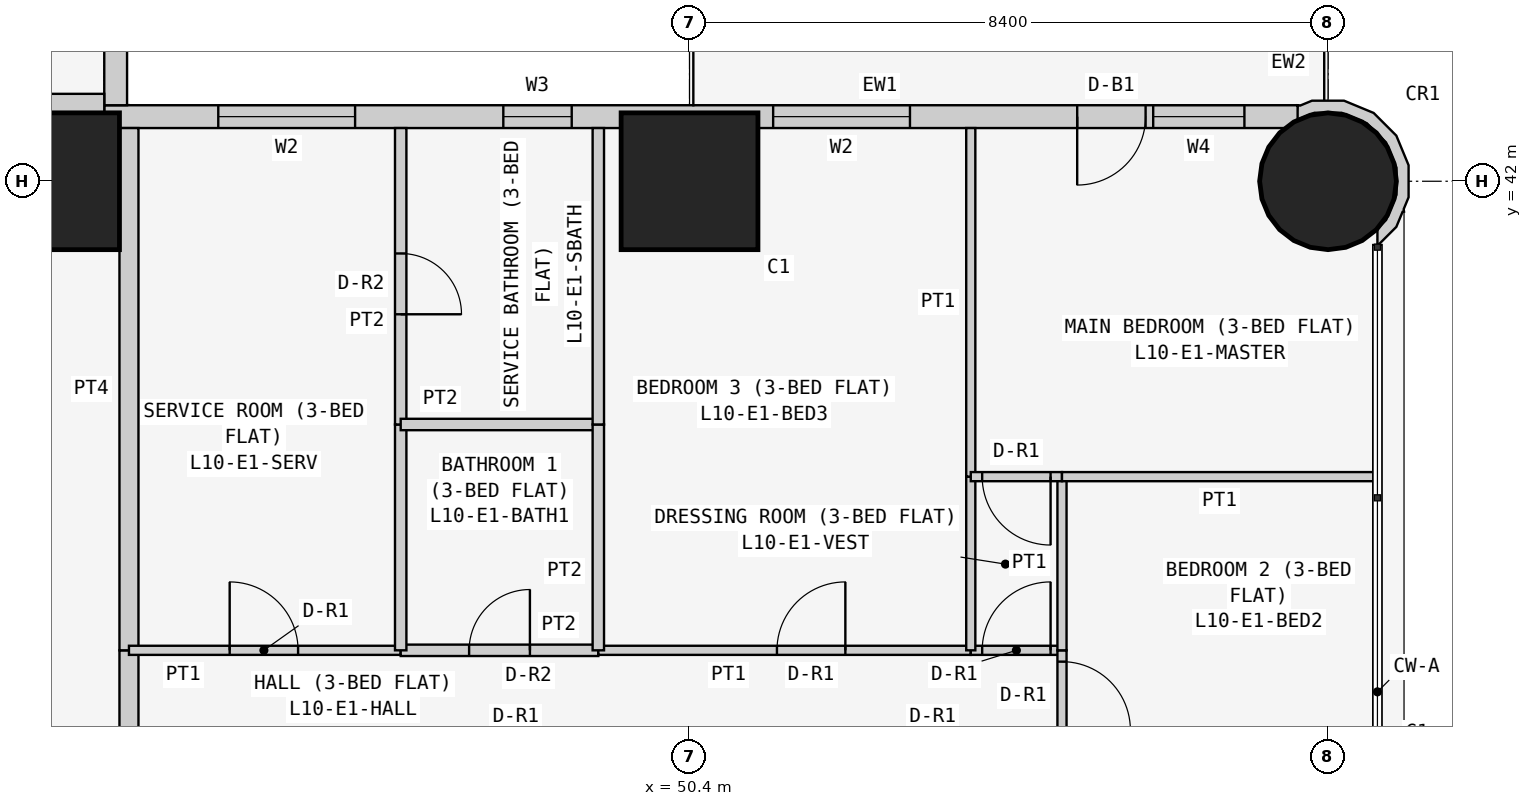
"""IFC4 building model, lengths in metres.
Left out: names, types, materials, properties, quantities, classifications, styles, units other than length and angle.
Written with IfcOpenShell. Run it as: python <this file> out.ifc"""

import sys

from ifc_helpers import new_model, si_unit, direction, frame, frame_2d, origin, origin_2d, place, context, subcontext, project, spatial, polyline, rectangle, circle, outline, extrude, element, fill, save


model = new_model("IFC4")
c1 = context("Model", 3, precision=1e-05, world=origin(), true_north=direction((0.0, 1.0)))
c2 = subcontext(c1, "Body", "Model", "MODEL_VIEW")
j1 = project(units=[si_unit("LENGTHUNIT", "METRE"), si_unit("PLANEANGLEUNIT", "RADIAN")], contexts=[c1])
p1 = place(None, origin())
s1 = spatial("IfcSite", under=j1, at=p1, CompositionType="ELEMENT")
p2 = place(p1, origin())
s2 = spatial("IfcBuilding", under=s1, at=p2, CompositionType="ELEMENT")
p3 = place(p2, frame((0.0, 0.0, 45.3)))
s3 = spatial("IfcBuildingStorey", under=s2, at=p3, CompositionType="ELEMENT", Elevation=45.3)
for number, where, z_axis, x_axis in (
    (1, (42.0, 42.0, 0.0), (0.0, 0.0, 1.0), (1.0, 0.0, 0.0)),
    (2, (50.4, 42.0, 0.0), (0.0, 0.0, 1.0), (1.0, 0.0, 0.0)),
):
    element("IfcColumn", number, at=place(p3, frame(where, z_axis=z_axis, x_axis=x_axis)), inside=s3, PredefinedType="COLUMN", context=c2, shape_type="SweptSolid", body=[
        extrude(rectangle(XDim=1.8, YDim=1.8, at=origin_2d()), origin(), (0.0, 0.0, 1.0), 3.6),
    ])
p4 = place(p3, frame((58.8, 42.0, 0.0), z_axis=(0.0, 0.0, 1.0), x_axis=(1.0, 0.0, 0.0)))
e3 = element("IfcColumn", 3, at=p4, inside=s3, PredefinedType="COLUMN", context=c2, shape_type="SweptSolid", body=[
    extrude(circle(Radius=0.9, at=origin_2d()), origin(), (0.0, 0.0, 1.0), 3.6),
])
p5 = place(p3, frame((58.4, 42.85, 0.0), z_axis=(0.0, 0.0, 1.0), x_axis=(-1.0, 0.0, 0.0)))
e4 = element("IfcWall", 4, at=p5, inside=s3, PredefinedType="SOLIDWALL", context=c2, shape_type="SweptSolid", body=[
    extrude(rectangle(XDim=15.7, YDim=0.3, at=frame_2d((7.85, 0.0))), origin(), (0.0, 0.0, 1.0), 3.45),
])
p6 = place(p5, frame((12.4, 0.0, 0.9)))
e5 = element("IfcOpeningElement", 5, at=p6, cuts=e4, PredefinedType="OPENING", context=c2, shape_type="SweptSolid", body=[
    extrude(rectangle(XDim=1.8, YDim=1.5, at=frame_2d((0.9, 0.75))), frame((0.0, 0.16, 0.0), z_axis=(0.0, -1.0, 0.0), x_axis=(1.0, 0.0, 0.0)), (0.0, 0.0, 1.0), 0.32),
])
p7 = place(p5, frame((9.55, 0.0, 1.5)))
e6 = element("IfcOpeningElement", 6, at=p7, cuts=e4, PredefinedType="OPENING", context=c2, shape_type="SweptSolid", body=[
    extrude(rectangle(XDim=0.9, YDim=0.7, at=frame_2d((0.45, 0.35))), frame((0.0, 0.16, 0.0), z_axis=(0.0, -1.0, 0.0), x_axis=(1.0, 0.0, 0.0)), (0.0, 0.0, 1.0), 0.32),
])
p8 = place(p5, frame((5.1, 0.0, 0.9)))
e7 = element("IfcOpeningElement", 7, at=p8, cuts=e4, PredefinedType="OPENING", context=c2, shape_type="SweptSolid", body=[
    extrude(rectangle(XDim=1.8, YDim=1.5, at=frame_2d((0.9, 0.75))), frame((0.0, 0.16, 0.0), z_axis=(0.0, -1.0, 0.0), x_axis=(1.0, 0.0, 0.0)), (0.0, 0.0, 1.0), 0.32),
])
p9 = place(p5, frame((2.0, 0.0, 0.0)))
e8 = element("IfcOpeningElement", 8, at=p9, cuts=e4, PredefinedType="OPENING", context=c2, shape_type="SweptSolid", body=[
    extrude(rectangle(XDim=0.9, YDim=2.4, at=frame_2d((0.45, 1.2))), frame((0.0, 0.16, 0.0), z_axis=(0.0, -1.0, 0.0), x_axis=(1.0, 0.0, 0.0)), (0.0, 0.0, 1.0), 0.32),
])
p10 = place(p5, frame((0.7, 0.0, 0.9)))
e9 = element("IfcOpeningElement", 9, at=p10, cuts=e4, PredefinedType="OPENING", context=c2, shape_type="SweptSolid", body=[
    extrude(rectangle(XDim=1.2, YDim=1.5, at=frame_2d((0.6, 0.75))), frame((0.0, 0.16, 0.0), z_axis=(0.0, -1.0, 0.0), x_axis=(1.0, 0.0, 0.0)), (0.0, 0.0, 1.0), 0.32),
])
p11 = place(p3, frame((42.85, 43.0, 0.0), z_axis=(0.0, 0.0, 1.0), x_axis=(0.0, 1.0, 0.0)))
e10 = element("IfcWall", 10, at=p11, inside=s3, PredefinedType="SOLIDWALL", context=c2, shape_type="SweptSolid", body=[
    extrude(rectangle(XDim=15.4, YDim=0.3, at=frame_2d((7.7, 0.0))), origin(), (0.0, 0.0, 1.0), 3.45),
])
p12 = place(p11, frame((1.2, 0.0, 0.9)))
e11 = element("IfcOpeningElement", 11, at=p12, cuts=e10, PredefinedType="OPENING", context=c2, shape_type="SweptSolid", body=[
    extrude(rectangle(XDim=1.8, YDim=1.5, at=frame_2d((0.9, 0.75))), frame((0.0, 0.16, 0.0), z_axis=(0.0, -1.0, 0.0), x_axis=(1.0, 0.0, 0.0)), (0.0, 0.0, 1.0), 0.32),
])
p13 = place(p11, frame((4.95, 0.0, 1.5)))
e12 = element("IfcOpeningElement", 12, at=p13, cuts=e10, PredefinedType="OPENING", context=c2, shape_type="SweptSolid", body=[
    extrude(rectangle(XDim=0.9, YDim=0.7, at=frame_2d((0.45, 0.35))), frame((0.0, 0.16, 0.0), z_axis=(0.0, -1.0, 0.0), x_axis=(1.0, 0.0, 0.0)), (0.0, 0.0, 1.0), 0.32),
])
p14 = place(p11, frame((8.5, 0.0, 0.9)))
e13 = element("IfcOpeningElement", 13, at=p14, cuts=e10, PredefinedType="OPENING", context=c2, shape_type="SweptSolid", body=[
    extrude(rectangle(XDim=1.8, YDim=1.5, at=frame_2d((0.9, 0.75))), frame((0.0, 0.16, 0.0), z_axis=(0.0, -1.0, 0.0), x_axis=(1.0, 0.0, 0.0)), (0.0, 0.0, 1.0), 0.32),
])
p15 = place(p11, frame((12.5, 0.0, 0.0)))
e14 = element("IfcOpeningElement", 14, at=p15, cuts=e10, PredefinedType="OPENING", context=c2, shape_type="SweptSolid", body=[
    extrude(rectangle(XDim=0.9, YDim=2.4, at=frame_2d((0.45, 1.2))), frame((0.0, 0.16, 0.0), z_axis=(0.0, -1.0, 0.0), x_axis=(1.0, 0.0, 0.0)), (0.0, 0.0, 1.0), 0.32),
])
p16 = place(p11, frame((13.5, 0.0, 0.9)))
e15 = element("IfcOpeningElement", 15, at=p16, cuts=e10, PredefinedType="OPENING", context=c2, shape_type="SweptSolid", body=[
    extrude(rectangle(XDim=1.2, YDim=1.5, at=frame_2d((0.6, 0.75))), frame((0.0, 0.16, 0.0), z_axis=(0.0, -1.0, 0.0), x_axis=(1.0, 0.0, 0.0)), (0.0, 0.0, 1.0), 0.32),
])
p17 = place(p3, frame((59.411, 41.233, 0.0), z_axis=(0.0, 0.0, 1.0), x_axis=(0.926129809145, 0.377204953059, 0.0)))
e16 = element("IfcWall", 16, at=p17, inside=s3, PredefinedType="SOLIDWALL", context=c2, shape_type="SweptSolid", body=[
    extrude(outline(polyline([(0.626, 0.345), (0.785, 0.736), (0.782, 1.157), (0.619, 1.546), (0.319, 1.843), (-0.072, 2.002), (-0.24, 2.001), (-0.27, 2.017), (-0.37, 1.841), (-0.102, 1.842), (0.23, 1.707), (0.485, 1.455), (0.624, 1.125), (0.626, 0.766), (0.491, 0.434), (0.238, 0.179), (0.09, 0.117), (0.011, -0.078), (0.024, -0.083), (0.329, 0.045), (0.48, 0.198), (0.499, 0.193), (0.508, 0.225), (0.626, 0.345)])), origin(), (0.0, 0.0, 1.0), 3.45),
])
p18 = place(p3, frame((35.829, 43.025, 0.0), z_axis=(0.0, 0.0, 1.0), x_axis=(1.0, 0.0, 0.0)))
e17 = element("IfcWall", 17, at=p18, inside=s3, PredefinedType="PARTITIONING", context=c2, shape_type="SweptSolid", body=[
    extrude(rectangle(XDim=6.871, YDim=0.25, at=frame_2d((3.436, 0.0))), origin(), (0.0, 0.0, 1.0), 3.45),
])
p19 = place(p3, frame((43.025, 35.829, 0.0), z_axis=(0.0, 0.0, 1.0), x_axis=(0.0, -1.0, 0.0)))
e18 = element("IfcWall", 18, at=p19, inside=s3, PredefinedType="PARTITIONING", context=c2, shape_type="SweptSolid", body=[
    extrude(rectangle(XDim=1.2, YDim=0.25, at=frame_2d((0.6, 0.0))), origin(), (0.0, 0.0, 1.0), 3.45),
])
p20 = place(p3, frame((43.025, 42.7, 0.0), z_axis=(0.0, 0.0, 1.0), x_axis=(0.0, -1.0, 0.0)))
e19 = element("IfcWall", 19, at=p20, inside=s3, PredefinedType="PARTITIONING", context=c2, shape_type="SweptSolid", body=[
    extrude(rectangle(XDim=6.871, YDim=0.25, at=frame_2d((3.436, 0.0))), origin(), (0.0, 0.0, 1.0), 3.45),
])
p21 = place(p3, frame((46.6, 35.829, 0.0), z_axis=(0.0, 0.0, 1.0), x_axis=(-1.0, 0.0, 0.0)))
e20 = element("IfcWall", 20, at=p21, inside=s3, PredefinedType="PARTITIONING", context=c2, shape_type="SweptSolid", body=[
    extrude(rectangle(XDim=3.575, YDim=0.12, at=frame_2d((1.788, 0.0))), origin(), (0.0, 0.0, 1.0), 3.45),
])
p22 = place(p21, frame((1.35, 0.0, 0.0)))
e21 = element("IfcOpeningElement", 21, at=p22, cuts=e20, PredefinedType="OPENING", context=c2, shape_type="SweptSolid", body=[
    extrude(rectangle(XDim=0.9, YDim=2.1, at=frame_2d((0.45, 1.05))), frame((0.0, 0.07, 0.0), z_axis=(0.0, -1.0, 0.0), x_axis=(1.0, 0.0, 0.0)), (0.0, 0.0, 1.0), 0.14),
])
p23 = place(p3, frame((49.2, 35.829, 0.0), z_axis=(0.0, 0.0, 1.0), x_axis=(-1.0, 0.0, 0.0)))
e22 = element("IfcWall", 22, at=p23, inside=s3, PredefinedType="PARTITIONING", context=c2, shape_type="SweptSolid", body=[
    extrude(rectangle(XDim=2.6, YDim=0.15, at=frame_2d((1.3, 0.0))), origin(), (0.0, 0.0, 1.0), 3.45),
])
p24 = place(p23, frame((0.9, 0.0, 0.0)))
e23 = element("IfcOpeningElement", 23, at=p24, cuts=e22, PredefinedType="OPENING", context=c2, shape_type="SweptSolid", body=[
    extrude(rectangle(XDim=0.8, YDim=2.1, at=frame_2d((0.4, 1.05))), frame((0.0, 0.085, 0.0), z_axis=(0.0, -1.0, 0.0), x_axis=(1.0, 0.0, 0.0)), (0.0, 0.0, 1.0), 0.17),
])
p25 = place(p3, frame((54.1, 35.829, 0.0), z_axis=(0.0, 0.0, 1.0), x_axis=(-1.0, 0.0, 0.0)))
e24 = element("IfcWall", 24, at=p25, inside=s3, PredefinedType="PARTITIONING", context=c2, shape_type="SweptSolid", body=[
    extrude(rectangle(XDim=4.9, YDim=0.12, at=frame_2d((2.45, 0.0))), origin(), (0.0, 0.0, 1.0), 3.45),
])
p26 = place(p25, frame((1.65, 0.0, 0.0)))
e25 = element("IfcOpeningElement", 25, at=p26, cuts=e24, PredefinedType="OPENING", context=c2, shape_type="SweptSolid", body=[
    extrude(rectangle(XDim=0.9, YDim=2.1, at=frame_2d((0.45, 1.05))), frame((0.0, 0.07, 0.0), z_axis=(0.0, -1.0, 0.0), x_axis=(1.0, 0.0, 0.0)), (0.0, 0.0, 1.0), 0.14),
])
p27 = place(p3, frame((55.3, 35.829, 0.0), z_axis=(0.0, 0.0, 1.0), x_axis=(-1.0, 0.0, 0.0)))
e26 = element("IfcWall", 26, at=p27, inside=s3, PredefinedType="PARTITIONING", context=c2, shape_type="SweptSolid", body=[
    extrude(rectangle(XDim=1.2, YDim=0.12, at=frame_2d((0.6, 0.0))), origin(), (0.0, 0.0, 1.0), 3.45),
])
p28 = place(p27, frame((0.15, 0.0, 0.0)))
e27 = element("IfcOpeningElement", 27, at=p28, cuts=e26, PredefinedType="OPENING", context=c2, shape_type="SweptSolid", body=[
    extrude(rectangle(XDim=0.9, YDim=2.1, at=frame_2d((0.45, 1.05))), frame((0.0, 0.07, 0.0), z_axis=(0.0, -1.0, 0.0), x_axis=(1.0, 0.0, 0.0)), (0.0, 0.0, 1.0), 0.14),
])
p29 = place(p3, frame((55.3, 34.629, 0.0), z_axis=(0.0, 0.0, 1.0), x_axis=(0.0, 1.0, 0.0)))
e28 = element("IfcWall", 28, at=p29, inside=s3, PredefinedType="PARTITIONING", context=c2, shape_type="SweptSolid", body=[
    extrude(rectangle(XDim=1.2, YDim=0.12, at=frame_2d((0.6, 0.0))), origin(), (0.0, 0.0, 1.0), 3.45),
])
p30 = place(p29, frame((0.151, 0.0, 0.0)))
e29 = element("IfcOpeningElement", 29, at=p30, cuts=e28, PredefinedType="OPENING", context=c2, shape_type="SweptSolid", body=[
    extrude(rectangle(XDim=0.9, YDim=2.1, at=frame_2d((0.45, 1.05))), frame((0.0, 0.07, 0.0), z_axis=(0.0, -1.0, 0.0), x_axis=(1.0, 0.0, 0.0)), (0.0, 0.0, 1.0), 0.14),
])
p31 = place(p3, frame((46.6, 35.829, 0.0), z_axis=(0.0, 0.0, 1.0), x_axis=(0.0, 1.0, 0.0)))
e30 = element("IfcWall", 30, at=p31, inside=s3, PredefinedType="PARTITIONING", context=c2, shape_type="SweptSolid", body=[
    extrude(rectangle(XDim=2.971, YDim=0.15, at=frame_2d((1.485, 0.0))), origin(), (0.0, 0.0, 1.0), 3.45),
])
p32 = place(p3, frame((46.6, 38.8, 0.0), z_axis=(0.0, 0.0, 1.0), x_axis=(0.0, 1.0, 0.0)))
e31 = element("IfcWall", 31, at=p32, inside=s3, PredefinedType="PARTITIONING", context=c2, shape_type="SweptSolid", body=[
    extrude(rectangle(XDim=3.9, YDim=0.15, at=frame_2d((1.95, 0.0))), origin(), (0.0, 0.0, 1.0), 3.45),
])
p33 = place(p32, frame((1.45, 0.0, 0.0)))
e32 = element("IfcOpeningElement", 32, at=p33, cuts=e31, PredefinedType="OPENING", context=c2, shape_type="SweptSolid", body=[
    extrude(rectangle(XDim=0.8, YDim=2.1, at=frame_2d((0.4, 1.05))), frame((0.0, 0.085, 0.0), z_axis=(0.0, -1.0, 0.0), x_axis=(1.0, 0.0, 0.0)), (0.0, 0.0, 1.0), 0.17),
])
p34 = place(p3, frame((49.2, 38.8, 0.0), z_axis=(0.0, 0.0, 1.0), x_axis=(-1.0, 0.0, 0.0)))
e33 = element("IfcWall", 33, at=p34, inside=s3, PredefinedType="PARTITIONING", context=c2, shape_type="SweptSolid", body=[
    extrude(rectangle(XDim=2.6, YDim=0.15, at=frame_2d((1.3, 0.0))), origin(), (0.0, 0.0, 1.0), 3.45),
])
p35 = place(p3, frame((49.2, 35.829, 0.0), z_axis=(0.0, 0.0, 1.0), x_axis=(0.0, 1.0, 0.0)))
e34 = element("IfcWall", 34, at=p35, inside=s3, PredefinedType="PARTITIONING", context=c2, shape_type="SweptSolid", body=[
    extrude(rectangle(XDim=2.971, YDim=0.15, at=frame_2d((1.485, 0.0))), origin(), (0.0, 0.0, 1.0), 3.45),
])
p36 = place(p3, frame((49.2, 38.8, 0.0), z_axis=(0.0, 0.0, 1.0), x_axis=(0.0, 1.0, 0.0)))
e35 = element("IfcWall", 35, at=p36, inside=s3, PredefinedType="PARTITIONING", context=c2, shape_type="SweptSolid", body=[
    extrude(rectangle(XDim=3.9, YDim=0.15, at=frame_2d((1.95, 0.0))), origin(), (0.0, 0.0, 1.0), 3.45),
])
p37 = place(p3, frame((54.1, 35.829, 0.0), z_axis=(0.0, 0.0, 1.0), x_axis=(0.0, 1.0, 0.0)))
e36 = element("IfcWall", 36, at=p37, inside=s3, PredefinedType="PARTITIONING", context=c2, shape_type="SweptSolid", body=[
    extrude(rectangle(XDim=2.285, YDim=0.12, at=frame_2d((1.143, 0.0))), origin(), (0.0, 0.0, 1.0), 3.45),
])
p38 = place(p3, frame((54.1, 38.114, 0.0), z_axis=(0.0, 0.0, 1.0), x_axis=(0.0, 1.0, 0.0)))
e37 = element("IfcWall", 37, at=p38, inside=s3, PredefinedType="PARTITIONING", context=c2, shape_type="SweptSolid", body=[
    extrude(rectangle(XDim=4.586, YDim=0.12, at=frame_2d((2.293, 0.0))), origin(), (0.0, 0.0, 1.0), 3.45),
])
p39 = place(p3, frame((55.3, 35.829, 0.0), z_axis=(0.0, 0.0, 1.0), x_axis=(0.0, 1.0, 0.0)))
e38 = element("IfcWall", 38, at=p39, inside=s3, PredefinedType="PARTITIONING", context=c2, shape_type="SweptSolid", body=[
    extrude(rectangle(XDim=2.285, YDim=0.12, at=frame_2d((1.143, 0.0))), origin(), (0.0, 0.0, 1.0), 3.45),
])
p40 = place(p3, frame((55.3, 38.114, 0.0), z_axis=(0.0, 0.0, 1.0), x_axis=(-1.0, 0.0, 0.0)))
e39 = element("IfcWall", 39, at=p40, inside=s3, PredefinedType="PARTITIONING", context=c2, shape_type="SweptSolid", body=[
    extrude(rectangle(XDim=1.2, YDim=0.12, at=frame_2d((0.6, 0.0))), origin(), (0.0, 0.0, 1.0), 3.45),
])
p41 = place(p40, frame((0.15, 0.0, 0.0)))
e40 = element("IfcOpeningElement", 40, at=p41, cuts=e39, PredefinedType="OPENING", context=c2, shape_type="SweptSolid", body=[
    extrude(rectangle(XDim=0.9, YDim=2.1, at=frame_2d((0.45, 1.05))), frame((0.0, 0.07, 0.0), z_axis=(0.0, -1.0, 0.0), x_axis=(1.0, 0.0, 0.0)), (0.0, 0.0, 1.0), 0.14),
])
p42 = place(p3, frame((59.45, 38.114, 0.0), z_axis=(0.0, 0.0, 1.0), x_axis=(-1.0, 0.0, 0.0)))
e41 = element("IfcWall", 41, at=p42, inside=s3, PredefinedType="PARTITIONING", context=c2, shape_type="SweptSolid", body=[
    extrude(rectangle(XDim=4.15, YDim=0.12, at=frame_2d((2.075, 0.0))), origin(), (0.0, 0.0, 1.0), 3.45),
])
p43 = place(p6, origin())
e42 = element("IfcWindow", 42, at=p43, inside=s3, PartitioningType="SINGLE_PANEL", PredefinedType="WINDOW", context=c2, shape_type="SweptSolid", body=[
    extrude(rectangle(XDim=1.8, YDim=1.5, at=frame_2d((0.9, 0.75))), frame((0.0, 0.03, 0.0), z_axis=(0.0, -1.0, 0.0), x_axis=(1.0, 0.0, 0.0)), (0.0, 0.0, 1.0), 0.06),
])
fill(e5, e42)
p44 = place(p7, origin())
e43 = element("IfcWindow", 43, at=p44, inside=s3, PartitioningType="SINGLE_PANEL", PredefinedType="WINDOW", context=c2, shape_type="SweptSolid", body=[
    extrude(rectangle(XDim=0.9, YDim=0.7, at=frame_2d((0.45, 0.35))), frame((0.0, 0.03, 0.0), z_axis=(0.0, -1.0, 0.0), x_axis=(1.0, 0.0, 0.0)), (0.0, 0.0, 1.0), 0.06),
])
fill(e6, e43)
p45 = place(p8, origin())
e44 = element("IfcWindow", 44, at=p45, inside=s3, PartitioningType="SINGLE_PANEL", PredefinedType="WINDOW", context=c2, shape_type="SweptSolid", body=[
    extrude(rectangle(XDim=1.8, YDim=1.5, at=frame_2d((0.9, 0.75))), frame((0.0, 0.03, 0.0), z_axis=(0.0, -1.0, 0.0), x_axis=(1.0, 0.0, 0.0)), (0.0, 0.0, 1.0), 0.06),
])
fill(e7, e44)
p46 = place(p9, origin())
e45 = element("IfcDoor", 45, at=p46, inside=s3, OperationType="SINGLE_SWING_RIGHT", PredefinedType="DOOR", context=c2, shape_type="SweptSolid", body=[
    extrude(rectangle(XDim=0.9, YDim=2.4, at=frame_2d((0.45, 1.2))), frame((0.0, 0.025, 0.0), z_axis=(0.0, -1.0, 0.0), x_axis=(1.0, 0.0, 0.0)), (0.0, 0.0, 1.0), 0.05),
])
fill(e8, e45)
p47 = place(p10, origin())
e46 = element("IfcWindow", 46, at=p47, inside=s3, PartitioningType="SINGLE_PANEL", PredefinedType="WINDOW", context=c2, shape_type="SweptSolid", body=[
    extrude(rectangle(XDim=1.2, YDim=1.5, at=frame_2d((0.6, 0.75))), frame((0.0, 0.03, 0.0), z_axis=(0.0, -1.0, 0.0), x_axis=(1.0, 0.0, 0.0)), (0.0, 0.0, 1.0), 0.06),
])
fill(e9, e46)
p48 = place(p22, frame((0.9, 0.0, 0.0), z_axis=(0.0, 0.0, 1.0), x_axis=(-1.0, 0.0, 0.0)))
e47 = element("IfcDoor", 47, at=p48, inside=s3, OperationType="SINGLE_SWING_LEFT", PredefinedType="DOOR", context=c2, shape_type="SweptSolid", body=[
    extrude(rectangle(XDim=0.9, YDim=2.1, at=frame_2d((0.45, 1.05))), frame((0.0, 0.025, 0.0), z_axis=(0.0, -1.0, 0.0), x_axis=(1.0, 0.0, 0.0)), (0.0, 0.0, 1.0), 0.05),
])
fill(e21, e47)
p49 = place(p33, frame((0.8, 0.0, 0.0), z_axis=(0.0, 0.0, 1.0), x_axis=(-1.0, 0.0, 0.0)))
e48 = element("IfcDoor", 48, at=p49, inside=s3, OperationType="SINGLE_SWING_RIGHT", PredefinedType="DOOR", context=c2, shape_type="SweptSolid", body=[
    extrude(rectangle(XDim=0.8, YDim=2.1, at=frame_2d((0.4, 1.05))), frame((0.0, 0.025, 0.0), z_axis=(0.0, -1.0, 0.0), x_axis=(1.0, 0.0, 0.0)), (0.0, 0.0, 1.0), 0.05),
])
fill(e32, e48)
p50 = place(p24, frame((0.8, 0.0, 0.0), z_axis=(0.0, 0.0, 1.0), x_axis=(-1.0, 0.0, 0.0)))
e49 = element("IfcDoor", 49, at=p50, inside=s3, OperationType="SINGLE_SWING_RIGHT", PredefinedType="DOOR", context=c2, shape_type="SweptSolid", body=[
    extrude(rectangle(XDim=0.8, YDim=2.1, at=frame_2d((0.4, 1.05))), frame((0.0, 0.025, 0.0), z_axis=(0.0, -1.0, 0.0), x_axis=(1.0, 0.0, 0.0)), (0.0, 0.0, 1.0), 0.05),
])
fill(e23, e49)
p51 = place(p26, frame((0.9, 0.0, 0.0), z_axis=(0.0, 0.0, 1.0), x_axis=(-1.0, 0.0, 0.0)))
e50 = element("IfcDoor", 50, at=p51, inside=s3, OperationType="SINGLE_SWING_RIGHT", PredefinedType="DOOR", context=c2, shape_type="SweptSolid", body=[
    extrude(rectangle(XDim=0.9, YDim=2.1, at=frame_2d((0.45, 1.05))), frame((0.0, 0.025, 0.0), z_axis=(0.0, -1.0, 0.0), x_axis=(1.0, 0.0, 0.0)), (0.0, 0.0, 1.0), 0.05),
])
fill(e25, e50)
p52 = place(p28, frame((0.9, 0.0, 0.0), z_axis=(0.0, 0.0, 1.0), x_axis=(-1.0, 0.0, 0.0)))
e51 = element("IfcDoor", 51, at=p52, inside=s3, OperationType="SINGLE_SWING_RIGHT", PredefinedType="DOOR", context=c2, shape_type="SweptSolid", body=[
    extrude(rectangle(XDim=0.9, YDim=2.1, at=frame_2d((0.45, 1.05))), frame((0.0, 0.025, 0.0), z_axis=(0.0, -1.0, 0.0), x_axis=(1.0, 0.0, 0.0)), (0.0, 0.0, 1.0), 0.05),
])
fill(e27, e51)
p53 = place(p41, origin())
e52 = element("IfcDoor", 52, at=p53, inside=s3, OperationType="SINGLE_SWING_LEFT", PredefinedType="DOOR", context=c2, shape_type="SweptSolid", body=[
    extrude(rectangle(XDim=0.9, YDim=2.1, at=frame_2d((0.45, 1.05))), frame((0.0, 0.025, 0.0), z_axis=(0.0, -1.0, 0.0), x_axis=(1.0, 0.0, 0.0)), (0.0, 0.0, 1.0), 0.05),
])
fill(e40, e52)
p54 = place(p30, frame((0.9, 0.0, 0.0), z_axis=(0.0, 0.0, 1.0), x_axis=(-1.0, 0.0, 0.0)))
e53 = element("IfcDoor", 53, at=p54, inside=s3, OperationType="SINGLE_SWING_RIGHT", PredefinedType="DOOR", context=c2, shape_type="SweptSolid", body=[
    extrude(rectangle(XDim=0.9, YDim=2.1, at=frame_2d((0.45, 1.05))), frame((0.0, 0.025, 0.0), z_axis=(0.0, -1.0, 0.0), x_axis=(1.0, 0.0, 0.0)), (0.0, 0.0, 1.0), 0.05),
])
fill(e29, e53)
save(model, sys.argv[1])
